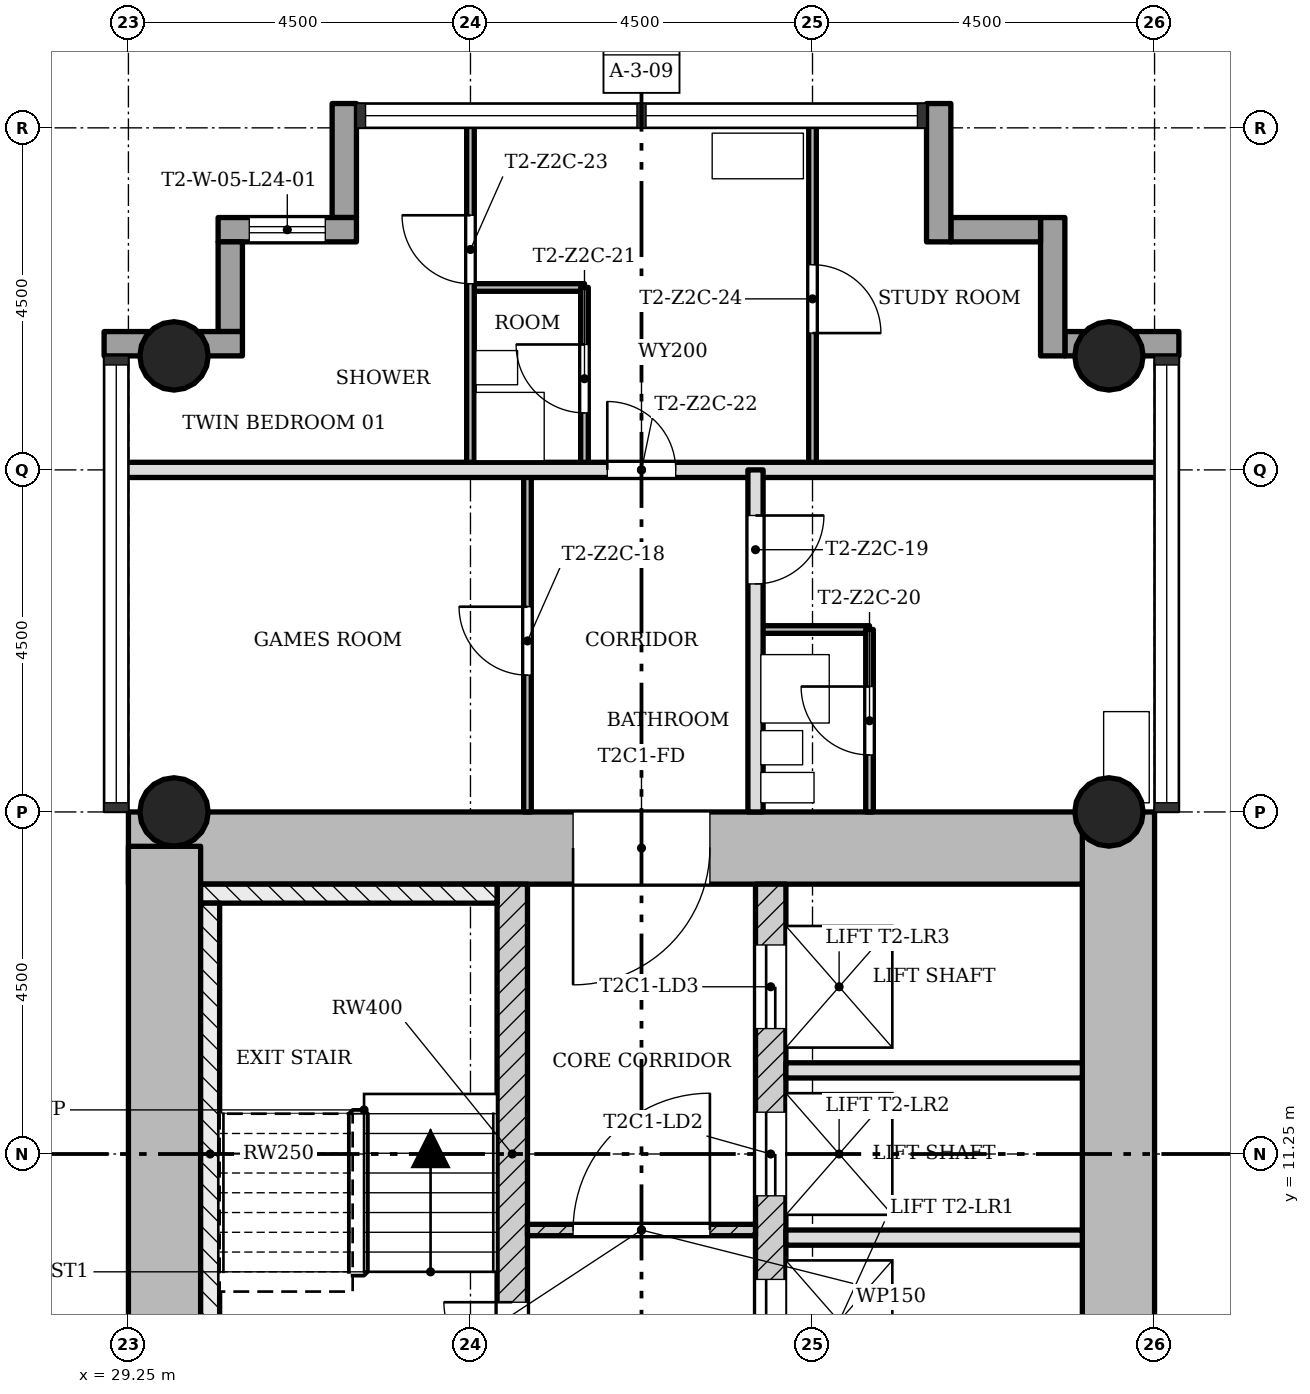
"""IFC4 building model, lengths in metres.
Left out: names, types, materials, properties, quantities, classifications, styles, units other than length and angle.
Written with IfcOpenShell. Run it as: python <this file> out.ifc"""

import sys

from ifc_helpers import new_model, si_unit, direction, frame, frame_2d, origin, origin_2d, place, context, subcontext, project, spatial, rectangle, hollow_circle, extrude, element, fill, save


model = new_model("IFC4")
c1 = context("Model", 3, precision=1e-05, world=origin(), true_north=direction((0.0, 1.0)))
c2 = subcontext(c1, "Body", "Model", "MODEL_VIEW")
j1 = project(units=[si_unit("LENGTHUNIT", "METRE"), si_unit("PLANEANGLEUNIT", "RADIAN")], contexts=[c1])
p1 = place(None, origin())
s1 = spatial("IfcSite", under=j1, at=p1, CompositionType="ELEMENT")
p2 = place(p1, origin())
s2 = spatial("IfcBuilding", under=s1, at=p2, CompositionType="ELEMENT")
p3 = place(p2, frame((0.0, 0.0, 90.2)))
s3 = spatial("IfcBuildingStorey", under=s2, at=p3, CompositionType="ELEMENT", Elevation=90.2)
p4 = place(p3, frame((42.275, 7.7, 0.0), z_axis=(0.0, 0.0, 1.0), x_axis=(0.0, 1.0, 0.0)))
e1 = element("IfcWall", 1, at=p4, inside=s3, PredefinedType="SHEAR", context=c2, shape_type="SweptSolid", body=[
    extrude(rectangle(XDim=8.05, YDim=0.95, at=frame_2d((4.025, 0.0))), origin(), (0.0, 0.0, 1.0), 3.4),
])
p5 = place(p3, frame((41.8, 15.275, 0.0), z_axis=(0.0, 0.0, 1.0), x_axis=(-1.0, 0.0, 0.0)))
e2 = element("IfcWall", 2, at=p5, inside=s3, PredefinedType="SHEAR", context=c2, shape_type="SweptSolid", body=[
    extrude(rectangle(XDim=12.55, YDim=0.95, at=frame_2d((6.275, 0.0))), origin(), (0.0, 0.0, 1.0), 3.4),
])
p6 = place(p5, frame((4.9, 0.0, 0.0)))
e3 = element("IfcOpeningElement", 3, at=p6, cuts=e2, PredefinedType="OPENING", context=c2, shape_type="SweptSolid", body=[
    extrude(rectangle(XDim=1.8, YDim=2.1, at=frame_2d((0.9, 1.05))), frame((0.0, 0.485, 0.0), z_axis=(0.0, -1.0, 0.0), x_axis=(1.0, 0.0, 0.0)), (0.0, 0.0, 1.0), 0.97),
])
p7 = place(p3, frame((29.725, 15.298, 0.0), z_axis=(0.0, 0.0, 1.0), x_axis=(0.0, -1.0, 0.0)))
e4 = element("IfcWall", 4, at=p7, inside=s3, PredefinedType="SHEAR", context=c2, shape_type="SweptSolid", body=[
    extrude(rectangle(XDim=8.696, YDim=0.95, at=frame_2d((4.348, 0.0))), origin(), (0.0, 0.0, 1.0), 3.4),
])
p8 = place(p3, frame((34.3, 7.7, 0.0), z_axis=(0.0, 0.0, 1.0), x_axis=(0.0, 1.0, 0.0)))
e5 = element("IfcWall", 5, at=p8, inside=s3, PredefinedType="SHEAR", context=c2, shape_type="SweptSolid", body=[
    extrude(rectangle(XDim=7.1, YDim=0.4, at=frame_2d((3.55, 0.0))), origin(), (0.0, 0.0, 1.0), 3.4),
])
p9 = place(p8, frame((0.7, 0.0, 0.0)))
e6 = element("IfcOpeningElement", 6, at=p9, cuts=e5, PredefinedType="OPENING", context=c2, shape_type="SweptSolid", body=[
    extrude(rectangle(XDim=0.9, YDim=2.1, at=frame_2d((0.45, 1.05))), frame((0.0, 0.21, 0.0), z_axis=(0.0, -1.0, 0.0), x_axis=(1.0, 0.0, 0.0)), (0.0, 0.0, 1.0), 0.42),
])
p10 = place(p3, frame((37.7, 7.7, 0.0), z_axis=(0.0, 0.0, 1.0), x_axis=(0.0, 1.0, 0.0)))
e7 = element("IfcWall", 7, at=p10, inside=s3, PredefinedType="SHEAR", context=c2, shape_type="SweptSolid", body=[
    extrude(rectangle(XDim=7.1, YDim=0.4, at=frame_2d((3.55, 0.0))), origin(), (0.0, 0.0, 1.0), 3.4),
])
p11 = place(p10, frame((0.8, 0.0, 0.0)))
e8 = element("IfcOpeningElement", 8, at=p11, cuts=e7, PredefinedType="OPENING", context=c2, shape_type="SweptSolid", body=[
    extrude(rectangle(XDim=1.1, YDim=2.1, at=frame_2d((0.55, 1.05))), frame((0.0, 0.21, 0.0), z_axis=(0.0, -1.0, 0.0), x_axis=(1.0, 0.0, 0.0)), (0.0, 0.0, 1.0), 0.42),
])
p12 = place(p10, frame((3.0, 0.0, 0.0)))
e9 = element("IfcOpeningElement", 9, at=p12, cuts=e7, PredefinedType="OPENING", context=c2, shape_type="SweptSolid", body=[
    extrude(rectangle(XDim=1.1, YDim=2.1, at=frame_2d((0.55, 1.05))), frame((0.0, 0.21, 0.0), z_axis=(0.0, -1.0, 0.0), x_axis=(1.0, 0.0, 0.0)), (0.0, 0.0, 1.0), 0.42),
])
p13 = place(p10, frame((5.2, 0.0, 0.0)))
e10 = element("IfcOpeningElement", 10, at=p13, cuts=e7, PredefinedType="OPENING", context=c2, shape_type="SweptSolid", body=[
    extrude(rectangle(XDim=1.1, YDim=2.1, at=frame_2d((0.55, 1.05))), frame((0.0, 0.21, 0.0), z_axis=(0.0, -1.0, 0.0), x_axis=(1.0, 0.0, 0.0)), (0.0, 0.0, 1.0), 0.42),
])
for number, where, z_axis, x_axis in (
    (11, (42.15, 15.75, 0.0), (0.0, 0.0, 1.0), (1.0, 0.0, 0.0)),
    (12, (29.85, 15.75, 0.0), (0.0, 0.0, 1.0), (1.0, 0.0, 0.0)),
    (13, (42.15, 21.75, 0.0), (0.0, 0.0, 1.0), (1.0, 0.0, 0.0)),
    (14, (29.85, 21.75, 0.0), (0.0, 0.0, 1.0), (1.0, 0.0, 0.0)),
):
    element("IfcColumn", number, at=place(p3, frame(where, z_axis=z_axis, x_axis=x_axis)), inside=s3, PredefinedType="COLUMN", context=c2, shape_type="SweptSolid", body=[
        extrude(hollow_circle(Radius=0.45, WallThickness=0.032, at=origin_2d()), origin(), (0.0, 0.0, 1.0), 3.4),
    ])
p14 = place(p3, frame((43.07, 21.91, -0.3), z_axis=(0.0, 0.0, 1.0), x_axis=(-1.0, 0.0, 0.0)))
e15 = element("IfcWall", 15, at=p14, inside=s3, PredefinedType="STANDARD", context=c2, shape_type="SweptSolid", body=[
    extrude(rectangle(XDim=1.5, YDim=0.32, at=frame_2d((0.75, 0.0))), origin(), (0.0, 0.0, 1.0), 3.4),
])
p15 = place(p3, frame((41.41, 21.75, -0.3), z_axis=(0.0, 0.0, 1.0), x_axis=(0.0, 1.0, 0.0)))
e16 = element("IfcWall", 16, at=p15, inside=s3, PredefinedType="STANDARD", context=c2, shape_type="SweptSolid", body=[
    extrude(rectangle(XDim=1.82, YDim=0.32, at=frame_2d((0.91, 0.0))), origin(), (0.0, 0.0, 1.0), 3.4),
])
p16 = place(p3, frame((41.25, 23.41, -0.3), z_axis=(0.0, 0.0, 1.0), x_axis=(-1.0, 0.0, 0.0)))
e17 = element("IfcWall", 17, at=p16, inside=s3, PredefinedType="STANDARD", context=c2, shape_type="SweptSolid", body=[
    extrude(rectangle(XDim=1.18, YDim=0.32, at=frame_2d((0.59, 0.0))), origin(), (0.0, 0.0, 1.0), 3.4),
])
p17 = place(p3, frame((39.91, 23.25, -0.3), z_axis=(0.0, 0.0, 1.0), x_axis=(0.0, 1.0, 0.0)))
e18 = element("IfcWall", 18, at=p17, inside=s3, PredefinedType="STANDARD", context=c2, shape_type="SweptSolid", body=[
    extrude(rectangle(XDim=1.82, YDim=0.32, at=frame_2d((0.91, 0.0))), origin(), (0.0, 0.0, 1.0), 3.4),
])
p18 = place(p3, frame((32.09, 25.07, -0.3), z_axis=(0.0, 0.0, 1.0), x_axis=(0.0, -1.0, 0.0)))
e19 = element("IfcWall", 19, at=p18, inside=s3, PredefinedType="STANDARD", context=c2, shape_type="SweptSolid", body=[
    extrude(rectangle(XDim=1.5, YDim=0.32, at=frame_2d((0.75, 0.0))), origin(), (0.0, 0.0, 1.0), 3.4),
])
p19 = place(p3, frame((32.25, 23.41, -0.3), z_axis=(0.0, 0.0, 1.0), x_axis=(-1.0, 0.0, 0.0)))
e20 = element("IfcWall", 20, at=p19, inside=s3, PredefinedType="STANDARD", context=c2, shape_type="SweptSolid", body=[
    extrude(rectangle(XDim=1.82, YDim=0.32, at=frame_2d((0.91, 0.0))), origin(), (0.0, 0.0, 1.0), 3.4),
])
p20 = place(p19, frame((0.41, 0.0, 1.2)))
e21 = element("IfcOpeningElement", 21, at=p20, cuts=e20, PredefinedType="OPENING", context=c2, shape_type="SweptSolid", body=[
    extrude(rectangle(XDim=1.0, YDim=1.5, at=frame_2d((0.5, 0.75))), frame((0.0, 0.17, 0.0), z_axis=(0.0, -1.0, 0.0), x_axis=(1.0, 0.0, 0.0)), (0.0, 0.0, 1.0), 0.34),
])
p21 = place(p3, frame((30.59, 23.25, -0.3), z_axis=(0.0, 0.0, 1.0), x_axis=(0.0, -1.0, 0.0)))
e22 = element("IfcWall", 22, at=p21, inside=s3, PredefinedType="STANDARD", context=c2, shape_type="SweptSolid", body=[
    extrude(rectangle(XDim=1.18, YDim=0.32, at=frame_2d((0.59, 0.0))), origin(), (0.0, 0.0, 1.0), 3.4),
])
p22 = place(p3, frame((30.75, 21.91, -0.3), z_axis=(0.0, 0.0, 1.0), x_axis=(-1.0, 0.0, 0.0)))
e23 = element("IfcWall", 23, at=p22, inside=s3, PredefinedType="STANDARD", context=c2, shape_type="SweptSolid", body=[
    extrude(rectangle(XDim=1.82, YDim=0.32, at=frame_2d((0.91, 0.0))), origin(), (0.0, 0.0, 1.0), 3.4),
])
p23 = place(p3, frame((37.5, 10.25, 0.0), z_axis=(0.0, 0.0, 1.0), x_axis=(-1.0, 0.0, 0.0)))
e24 = element("IfcWall", 24, at=p23, inside=s3, PredefinedType="PARTITIONING", context=c2, shape_type="SweptSolid", body=[
    extrude(rectangle(XDim=3.0, YDim=0.15, at=frame_2d((1.5, 0.0))), origin(), (0.0, 0.0, 1.0), 3.0),
])
p24 = place(p23, frame((0.6, 0.0, 0.0)))
e25 = element("IfcOpeningElement", 25, at=p24, cuts=e24, PredefinedType="OPENING", context=c2, shape_type="SweptSolid", body=[
    extrude(rectangle(XDim=1.8, YDim=2.1, at=frame_2d((0.9, 1.05))), frame((0.0, 0.085, 0.0), z_axis=(0.0, -1.0, 0.0), x_axis=(1.0, 0.0, 0.0)), (0.0, 0.0, 1.0), 0.17),
])
for number, where, z_axis, x_axis in (
    (26, (41.8, 10.15, 0.0), (0.0, 0.0, 1.0), (-1.0, 0.0, 0.0)),
    (27, (41.8, 12.35, 0.0), (0.0, 0.0, 1.0), (-1.0, 0.0, 0.0)),
):
    element("IfcWall", number, at=place(p3, frame(where, z_axis=z_axis, x_axis=x_axis)), inside=s3, PredefinedType="SOLIDWALL", context=c2, shape_type="SweptSolid", body=[
        extrude(rectangle(XDim=3.9, YDim=0.2, at=frame_2d((1.95, 0.0))), origin(), (0.0, 0.0, 1.0), 3.0),
    ])
p25 = place(p3, frame((39.0, 18.15, 0.0), z_axis=(0.0, 0.0, 1.0), x_axis=(-1.0, 0.0, 0.0)))
e28 = element("IfcWall", 28, at=p25, inside=s3, PredefinedType="PARTITIONING", context=c2, shape_type="SweptSolid", body=[
    extrude(rectangle(XDim=1.5, YDim=0.1, at=frame_2d((0.75, 0.0))), origin(), (0.0, 0.0, 1.0), 3.0),
])
p26 = place(p3, frame((42.85, 20.25, 0.0), z_axis=(0.0, 0.0, 1.0), x_axis=(-1.0, 0.0, 0.0)))
e29 = element("IfcWall", 29, at=p26, inside=s3, PredefinedType="SOLIDWALL", context=c2, shape_type="SweptSolid", body=[
    extrude(rectangle(XDim=13.7, YDim=0.2, at=frame_2d((6.85, 0.0))), origin(), (0.0, 0.0, 1.0), 3.0),
])
p27 = place(p26, frame((6.4, 0.0, 0.0)))
e30 = element("IfcOpeningElement", 30, at=p27, cuts=e29, PredefinedType="OPENING", context=c2, shape_type="SweptSolid", body=[
    extrude(rectangle(XDim=0.9, YDim=2.1, at=frame_2d((0.45, 1.05))), frame((0.0, 0.11, 0.0), z_axis=(0.0, -1.0, 0.0), x_axis=(1.0, 0.0, 0.0)), (0.0, 0.0, 1.0), 0.22),
])
p28 = place(p3, frame((35.25, 22.65, 0.0), z_axis=(0.0, 0.0, 1.0), x_axis=(-1.0, 0.0, 0.0)))
e31 = element("IfcWall", 31, at=p28, inside=s3, PredefinedType="PARTITIONING", context=c2, shape_type="SweptSolid", body=[
    extrude(rectangle(XDim=1.5, YDim=0.1, at=frame_2d((0.75, 0.0))), origin(), (0.0, 0.0, 1.0), 3.0),
])
p29 = place(p3, frame((39.0, 15.75, 0.0), z_axis=(0.0, 0.0, 1.0), x_axis=(0.0, 1.0, 0.0)))
e32 = element("IfcWall", 32, at=p29, inside=s3, PredefinedType="PARTITIONING", context=c2, shape_type="SweptSolid", body=[
    extrude(rectangle(XDim=2.4, YDim=0.1, at=frame_2d((1.2, 0.0))), origin(), (0.0, 0.0, 1.0), 3.0),
])
p30 = place(p29, frame((0.75, 0.0, 0.0)))
e33 = element("IfcOpeningElement", 33, at=p30, cuts=e32, PredefinedType="OPENING", context=c2, shape_type="SweptSolid", body=[
    extrude(rectangle(XDim=0.9, YDim=2.1, at=frame_2d((0.45, 1.05))), frame((0.0, 0.06, 0.0), z_axis=(0.0, -1.0, 0.0), x_axis=(1.0, 0.0, 0.0)), (0.0, 0.0, 1.0), 0.12),
])
p31 = place(p3, frame((38.25, 20.25, 0.0), z_axis=(0.0, 0.0, 1.0), x_axis=(0.0, 1.0, 0.0)))
e34 = element("IfcWall", 34, at=p31, inside=s3, PredefinedType="PARTITIONING", context=c2, shape_type="SweptSolid", body=[
    extrude(rectangle(XDim=4.6, YDim=0.1, at=frame_2d((2.3, 0.0))), origin(), (0.0, 0.0, 1.0), 3.0),
])
p32 = place(p31, frame((1.8, 0.0, 0.0)))
e35 = element("IfcOpeningElement", 35, at=p32, cuts=e34, PredefinedType="OPENING", context=c2, shape_type="SweptSolid", body=[
    extrude(rectangle(XDim=0.9, YDim=2.1, at=frame_2d((0.45, 1.05))), frame((0.0, 0.06, 0.0), z_axis=(0.0, -1.0, 0.0), x_axis=(1.0, 0.0, 0.0)), (0.0, 0.0, 1.0), 0.12),
])
p33 = place(p3, frame((37.5, 15.75, 0.0), z_axis=(0.0, 0.0, 1.0), x_axis=(0.0, 1.0, 0.0)))
e36 = element("IfcWall", 36, at=p33, inside=s3, PredefinedType="SOLIDWALL", context=c2, shape_type="SweptSolid", body=[
    extrude(rectangle(XDim=4.5, YDim=0.2, at=frame_2d((2.25, 0.0))), origin(), (0.0, 0.0, 1.0), 3.0),
])
p34 = place(p33, frame((3.0, 0.0, 0.0)))
e37 = element("IfcOpeningElement", 37, at=p34, cuts=e36, PredefinedType="OPENING", context=c2, shape_type="SweptSolid", body=[
    extrude(rectangle(XDim=0.9, YDim=2.1, at=frame_2d((0.45, 1.05))), frame((0.0, 0.11, 0.0), z_axis=(0.0, -1.0, 0.0), x_axis=(1.0, 0.0, 0.0)), (0.0, 0.0, 1.0), 0.22),
])
p35 = place(p3, frame((35.25, 20.25, 0.0), z_axis=(0.0, 0.0, 1.0), x_axis=(0.0, 1.0, 0.0)))
e38 = element("IfcWall", 38, at=p35, inside=s3, PredefinedType="PARTITIONING", context=c2, shape_type="SweptSolid", body=[
    extrude(rectangle(XDim=2.4, YDim=0.1, at=frame_2d((1.2, 0.0))), origin(), (0.0, 0.0, 1.0), 3.0),
])
p36 = place(p35, frame((0.75, 0.0, 0.0)))
e39 = element("IfcOpeningElement", 39, at=p36, cuts=e38, PredefinedType="OPENING", context=c2, shape_type="SweptSolid", body=[
    extrude(rectangle(XDim=0.9, YDim=2.1, at=frame_2d((0.45, 1.05))), frame((0.0, 0.06, 0.0), z_axis=(0.0, -1.0, 0.0), x_axis=(1.0, 0.0, 0.0)), (0.0, 0.0, 1.0), 0.12),
])
p37 = place(p3, frame((34.5, 15.75, 0.0), z_axis=(0.0, 0.0, 1.0), x_axis=(0.0, 1.0, 0.0)))
e40 = element("IfcWall", 40, at=p37, inside=s3, PredefinedType="PARTITIONING", context=c2, shape_type="SweptSolid", body=[
    extrude(rectangle(XDim=4.5, YDim=0.1, at=frame_2d((2.25, 0.0))), origin(), (0.0, 0.0, 1.0), 3.0),
])
p38 = place(p37, frame((1.8, 0.0, 0.0)))
e41 = element("IfcOpeningElement", 41, at=p38, cuts=e40, PredefinedType="OPENING", context=c2, shape_type="SweptSolid", body=[
    extrude(rectangle(XDim=0.9, YDim=2.1, at=frame_2d((0.45, 1.05))), frame((0.0, 0.06, 0.0), z_axis=(0.0, -1.0, 0.0), x_axis=(1.0, 0.0, 0.0)), (0.0, 0.0, 1.0), 0.12),
])
p39 = place(p3, frame((33.75, 20.25, 0.0), z_axis=(0.0, 0.0, 1.0), x_axis=(0.0, 1.0, 0.0)))
e42 = element("IfcWall", 42, at=p39, inside=s3, PredefinedType="PARTITIONING", context=c2, shape_type="SweptSolid", body=[
    extrude(rectangle(XDim=4.6, YDim=0.1, at=frame_2d((2.3, 0.0))), origin(), (0.0, 0.0, 1.0), 3.0),
])
p40 = place(p39, frame((2.45, 0.0, 0.0)))
e43 = element("IfcOpeningElement", 43, at=p40, cuts=e42, PredefinedType="OPENING", context=c2, shape_type="SweptSolid", body=[
    extrude(rectangle(XDim=0.9, YDim=2.1, at=frame_2d((0.45, 1.05))), frame((0.0, 0.06, 0.0), z_axis=(0.0, -1.0, 0.0), x_axis=(1.0, 0.0, 0.0)), (0.0, 0.0, 1.0), 0.12),
])
p41 = place(p3, frame((34.1, 14.675, 0.0), z_axis=(0.0, 0.0, 1.0), x_axis=(-1.0, 0.0, 0.0)))
e44 = element("IfcWall", 44, at=p41, inside=s3, PredefinedType="SHEAR", context=c2, shape_type="SweptSolid", body=[
    extrude(rectangle(XDim=3.9, YDim=0.25, at=frame_2d((1.95, 0.0))), origin(), (0.0, 0.0, 1.0), 3.4),
])
p42 = place(p3, frame((30.325, 7.95, 0.0), z_axis=(0.0, 0.0, 1.0), x_axis=(0.0, 1.0, 0.0)))
e45 = element("IfcWall", 45, at=p42, inside=s3, PredefinedType="SHEAR", context=c2, shape_type="SweptSolid", body=[
    extrude(rectangle(XDim=6.6, YDim=0.25, at=frame_2d((3.3, 0.0))), origin(), (0.0, 0.0, 1.0), 3.4),
])
p43 = place(p24, origin())
e46 = element("IfcDoor", 46, at=p43, inside=s3, OperationType="SINGLE_SWING_LEFT", PredefinedType="DOOR", context=c2, shape_type="SweptSolid", body=[
    extrude(rectangle(XDim=1.8, YDim=2.1, at=frame_2d((0.9, 1.05))), frame((0.0, 0.025, 0.0), z_axis=(0.0, -1.0, 0.0), x_axis=(1.0, 0.0, 0.0)), (0.0, 0.0, 1.0), 0.05),
])
fill(e25, e46)
p44 = place(p38, origin())
e47 = element("IfcDoor", 47, at=p44, inside=s3, OperationType="SINGLE_SWING_LEFT", PredefinedType="DOOR", context=c2, shape_type="SweptSolid", body=[
    extrude(rectangle(XDim=0.9, YDim=2.1, at=frame_2d((0.45, 1.05))), frame((0.0, 0.025, 0.0), z_axis=(0.0, -1.0, 0.0), x_axis=(1.0, 0.0, 0.0)), (0.0, 0.0, 1.0), 0.05),
])
fill(e41, e47)
p45 = place(p34, origin())
e48 = element("IfcDoor", 48, at=p45, inside=s3, OperationType="SINGLE_SWING_RIGHT", PredefinedType="DOOR", context=c2, shape_type="SweptSolid", body=[
    extrude(rectangle(XDim=0.9, YDim=2.1, at=frame_2d((0.45, 1.05))), frame((0.0, 0.025, 0.0), z_axis=(0.0, -1.0, 0.0), x_axis=(1.0, 0.0, 0.0)), (0.0, 0.0, 1.0), 0.05),
])
fill(e37, e48)
p46 = place(p30, origin())
e49 = element("IfcDoor", 49, at=p46, inside=s3, OperationType="SINGLE_SWING_LEFT", PredefinedType="DOOR", context=c2, shape_type="SweptSolid", body=[
    extrude(rectangle(XDim=0.9, YDim=2.1, at=frame_2d((0.45, 1.05))), frame((0.0, 0.025, 0.0), z_axis=(0.0, -1.0, 0.0), x_axis=(1.0, 0.0, 0.0)), (0.0, 0.0, 1.0), 0.05),
])
fill(e33, e49)
p47 = place(p36, origin())
e50 = element("IfcDoor", 50, at=p47, inside=s3, OperationType="SINGLE_SWING_LEFT", PredefinedType="DOOR", context=c2, shape_type="SweptSolid", body=[
    extrude(rectangle(XDim=0.9, YDim=2.1, at=frame_2d((0.45, 1.05))), frame((0.0, 0.025, 0.0), z_axis=(0.0, -1.0, 0.0), x_axis=(1.0, 0.0, 0.0)), (0.0, 0.0, 1.0), 0.05),
])
fill(e39, e50)
p48 = place(p27, origin())
e51 = element("IfcDoor", 51, at=p48, inside=s3, OperationType="SINGLE_SWING_RIGHT", PredefinedType="DOOR", context=c2, shape_type="SweptSolid", body=[
    extrude(rectangle(XDim=0.9, YDim=2.1, at=frame_2d((0.45, 1.05))), frame((0.0, 0.025, 0.0), z_axis=(0.0, -1.0, 0.0), x_axis=(1.0, 0.0, 0.0)), (0.0, 0.0, 1.0), 0.05),
])
fill(e30, e51)
p49 = place(p40, origin())
e52 = element("IfcDoor", 52, at=p49, inside=s3, OperationType="SINGLE_SWING_LEFT", PredefinedType="DOOR", context=c2, shape_type="SweptSolid", body=[
    extrude(rectangle(XDim=0.9, YDim=2.1, at=frame_2d((0.45, 1.05))), frame((0.0, 0.025, 0.0), z_axis=(0.0, -1.0, 0.0), x_axis=(1.0, 0.0, 0.0)), (0.0, 0.0, 1.0), 0.05),
])
fill(e43, e52)
p50 = place(p32, origin())
e53 = element("IfcDoor", 53, at=p50, inside=s3, OperationType="SINGLE_SWING_LEFT", PredefinedType="DOOR", context=c2, shape_type="SweptSolid", body=[
    extrude(rectangle(XDim=0.9, YDim=2.1, at=frame_2d((0.45, 1.05))), frame((0.0, 0.025, 0.0), z_axis=(0.0, -1.0, 0.0), x_axis=(1.0, 0.0, 0.0)), (0.0, 0.0, 1.0), 0.05),
])
fill(e35, e53)
p51 = place(p9, origin())
e54 = element("IfcDoor", 54, at=p51, inside=s3, OperationType="SINGLE_SWING_LEFT", PredefinedType="DOOR", context=c2, shape_type="SweptSolid", body=[
    extrude(rectangle(XDim=0.9, YDim=2.1, at=frame_2d((0.45, 1.05))), frame((0.0, 0.025, 0.0), z_axis=(0.0, -1.0, 0.0), x_axis=(1.0, 0.0, 0.0)), (0.0, 0.0, 1.0), 0.05),
])
fill(e6, e54)
p52 = place(p11, origin())
e55 = element("IfcDoor", 55, at=p52, inside=s3, OperationType="SLIDING_TO_LEFT", PredefinedType="DOOR", context=c2, shape_type="SweptSolid", body=[
    extrude(rectangle(XDim=1.1, YDim=2.1, at=frame_2d((0.55, 1.05))), frame((0.0, 0.025, 0.0), z_axis=(0.0, -1.0, 0.0), x_axis=(1.0, 0.0, 0.0)), (0.0, 0.0, 1.0), 0.05),
])
fill(e8, e55)
p53 = place(p12, origin())
e56 = element("IfcDoor", 56, at=p53, inside=s3, OperationType="SLIDING_TO_LEFT", PredefinedType="DOOR", context=c2, shape_type="SweptSolid", body=[
    extrude(rectangle(XDim=1.1, YDim=2.1, at=frame_2d((0.55, 1.05))), frame((0.0, 0.025, 0.0), z_axis=(0.0, -1.0, 0.0), x_axis=(1.0, 0.0, 0.0)), (0.0, 0.0, 1.0), 0.05),
])
fill(e9, e56)
p54 = place(p13, origin())
e57 = element("IfcDoor", 57, at=p54, inside=s3, OperationType="SLIDING_TO_LEFT", PredefinedType="DOOR", context=c2, shape_type="SweptSolid", body=[
    extrude(rectangle(XDim=1.1, YDim=2.1, at=frame_2d((0.55, 1.05))), frame((0.0, 0.025, 0.0), z_axis=(0.0, -1.0, 0.0), x_axis=(1.0, 0.0, 0.0)), (0.0, 0.0, 1.0), 0.05),
])
fill(e10, e57)
p55 = place(p6, origin())
e58 = element("IfcDoor", 58, at=p55, inside=s3, OperationType="SINGLE_SWING_LEFT", PredefinedType="DOOR", context=c2, shape_type="SweptSolid", body=[
    extrude(rectangle(XDim=1.8, YDim=2.1, at=frame_2d((0.9, 1.05))), frame((0.0, 0.025, 0.0), z_axis=(0.0, -1.0, 0.0), x_axis=(1.0, 0.0, 0.0)), (0.0, 0.0, 1.0), 0.05),
])
fill(e3, e58)
p56 = place(p20, origin())
e59 = element("IfcWindow", 59, at=p56, inside=s3, PartitioningType="SINGLE_PANEL", PredefinedType="WINDOW", context=c2, shape_type="SweptSolid", body=[
    extrude(rectangle(XDim=1.0, YDim=1.5, at=frame_2d((0.5, 0.75))), frame((0.0, 0.03, 0.0), z_axis=(0.0, -1.0, 0.0), x_axis=(1.0, 0.0, 0.0)), (0.0, 0.0, 1.0), 0.06),
])
fill(e21, e59)
save(model, sys.argv[1])
